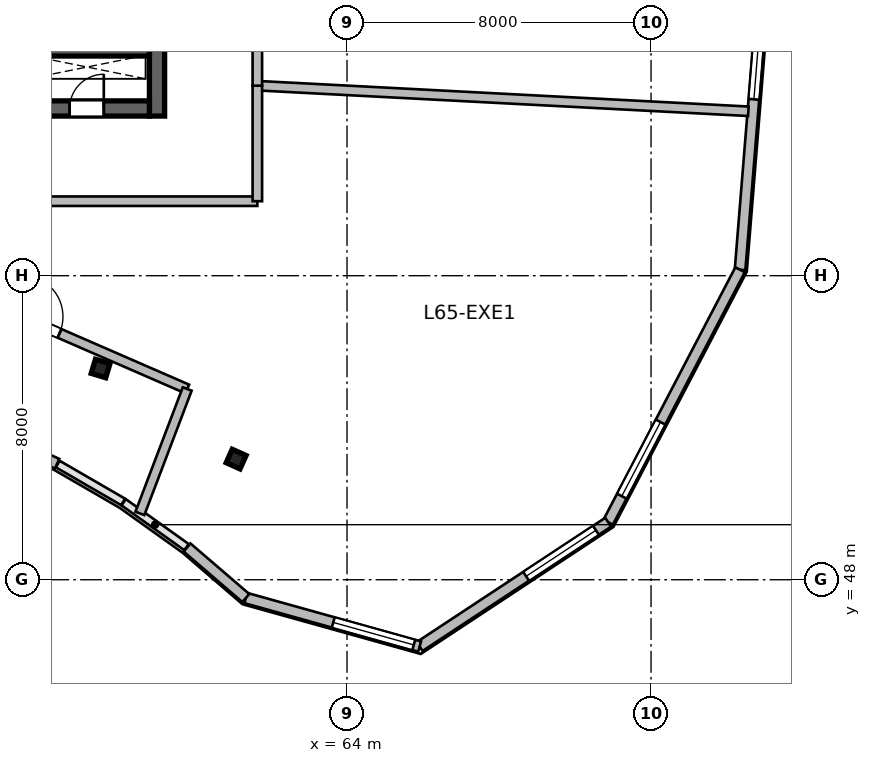
"""IFC4 building model, lengths in metres.
Left out: names, types, materials, properties, quantities, classifications, styles, units other than length and angle.
Written with IfcOpenShell. Run it as: python <this file> out.ifc"""

import sys

from ifc_helpers import new_model, si_unit, direction, frame, frame_2d, origin, origin_2d, place, context, subcontext, project, spatial, rectangle, i_section, extrude, source, transform, mapped, element, fill, save


model = new_model("IFC4")
c1 = context("Model", 3, precision=1e-05, world=origin(), true_north=direction((0.0, 1.0)))
c2 = subcontext(c1, "Body", "Model", "MODEL_VIEW")
j1 = project(units=[si_unit("LENGTHUNIT", "METRE"), si_unit("PLANEANGLEUNIT", "RADIAN")], contexts=[c1])
p1 = place(None, origin())
s1 = spatial("IfcSite", under=j1, at=p1, CompositionType="ELEMENT")
p2 = place(p1, origin())
s2 = spatial("IfcBuilding", under=s1, at=p2, CompositionType="ELEMENT")
p3 = place(p2, frame((0.0, 0.0, 267.9)))
s3 = spatial("IfcBuildingStorey", under=s2, at=p3, CompositionType="ELEMENT", Elevation=267.9)
m1 = source(origin(), c2, "Body", "SweptSolid", [
    extrude(rectangle(XDim=12.0, YDim=0.4, at=frame_2d((6.0, 0.0))), origin(), (0.0, 0.0, 1.0), 3.9),
])
p4 = place(p3, frame((59.0, 60.2, 0.0), z_axis=(0.0, 0.0, 1.0), x_axis=(0.0, 1.0, 0.0)))
e1 = element("IfcWall", 1, at=p4, inside=s3, PredefinedType="SHEAR", context=c2, shape_type="MappedRepresentation", body=[
    mapped(m1, transform((0.0, 0.0, 0.0), scale=1.0)),
])
m2 = source(origin(), c2, "Body", "SweptSolid", [
    extrude(rectangle(XDim=21.6, YDim=0.4, at=frame_2d((10.8, 0.0))), origin(), (0.0, 0.0, 1.0), 3.9),
])
p5 = place(p3, frame((37.2, 60.4, 0.0), z_axis=(0.0, 0.0, 1.0), x_axis=(1.0, 0.0, 0.0)))
e2 = element("IfcWall", 2, at=p5, inside=s3, PredefinedType="SHEAR", context=c2, shape_type="MappedRepresentation", body=[
    mapped(m2, transform((0.0, 0.0, 0.0), scale=1.0)),
])
p6 = place(p5, frame((1.1, 0.0, 0.0)))
e3 = element("IfcOpeningElement", 3, at=p6, cuts=e2, PredefinedType="OPENING", context=c2, shape_type="SweptSolid", body=[
    extrude(rectangle(XDim=1.15, YDim=2.15, at=frame_2d((0.575, 1.075))), frame((0.0, 0.21, 0.0), z_axis=(0.0, -1.0, 0.0), x_axis=(1.0, 0.0, 0.0)), (0.0, 0.0, 1.0), 0.42),
])
p7 = place(p5, frame((19.5, 0.0, 0.0)))
e4 = element("IfcOpeningElement", 4, at=p7, cuts=e2, PredefinedType="OPENING", context=c2, shape_type="SweptSolid", body=[
    extrude(rectangle(XDim=0.9, YDim=2.1, at=frame_2d((0.45, 1.05))), frame((0.0, 0.21, 0.0), z_axis=(0.0, -1.0, 0.0), x_axis=(1.0, 0.0, 0.0)), (0.0, 0.0, 1.0), 0.42),
])
p8 = place(p5, frame((12.02, 0.0, 0.0)))
e5 = element("IfcOpeningElement", 5, at=p8, cuts=e2, PredefinedType="OPENING", context=c2, shape_type="SweptSolid", body=[
    extrude(rectangle(XDim=1.6, YDim=2.15, at=frame_2d((0.8, 1.075))), frame((0.0, 0.21, 0.0), z_axis=(0.0, -1.0, 0.0), x_axis=(1.0, 0.0, 0.0)), (0.0, 0.0, 1.0), 0.42),
])
m3 = source(origin(), c2, "Body", "SweptSolid", [
    extrude(rectangle(XDim=3.27, YDim=0.22, at=frame_2d((1.635, 0.0))), origin(), (0.0, 0.0, 1.0), 3.9),
])
p9 = place(p3, frame((55.53, 61.89, 0.0), z_axis=(0.0, 0.0, 1.0), x_axis=(1.0, 0.0, 0.0)))
e6 = element("IfcWall", 6, at=p9, inside=s3, PredefinedType="SHEAR", context=c2, shape_type="MappedRepresentation", body=[
    mapped(m3, transform((0.0, 0.0, 0.0), scale=1.0)),
])
m4 = source(origin(), c2, "Body", "SweptSolid", [
    extrude(i_section(OverallWidth=0.399, OverallDepth=0.387, WebThickness=0.021, FlangeThickness=0.033, at=origin_2d()), origin(), (0.0, 0.0, 1.0), 3.9),
])
for number, where, z_axis, x_axis in (
    (7, (57.515, 53.558, 0.0), (0.0, 0.0, 1.0), (0.289, 0.957, 0.0)),
    (8, (61.082, 51.175, 0.0), (0.0, 0.0, 1.0), (0.409, 0.912, 0.0)),
):
    element("IfcColumn", number, at=place(p3, frame(where, z_axis=z_axis, x_axis=x_axis)), inside=s3, PredefinedType="COLUMN", context=c2, shape_type="MappedRepresentation", body=[
        mapped(m4, transform((0.0, 0.0, 0.0), scale=1.0)),
    ])
m5 = source(origin(), c2, "Body", "SweptSolid", [
    extrude(rectangle(XDim=7.466, YDim=0.28, at=frame_2d((3.733, 0.0))), origin(), (0.0, 0.0, 1.0), 3.65),
])
p10 = place(p3, frame((74.946, 63.597, 0.0), z_axis=(0.0, 0.0, 1.0), x_axis=(-0.080804454221, -0.996729973553, 0.0)))
e9 = element("IfcWall", 9, at=p10, inside=s3, PredefinedType="SOLIDWALL", context=c2, shape_type="MappedRepresentation", body=[
    mapped(m5, transform((0.0, 0.0, 0.0), scale=1.0)),
])
p11 = place(p10, frame((0.767, 0.0, 0.95)))
e10 = element("IfcOpeningElement", 10, at=p11, cuts=e9, PredefinedType="OPENING", context=c2, shape_type="SweptSolid", body=[
    extrude(rectangle(XDim=2.2, YDim=2.1, at=frame_2d((1.1, 1.05))), frame((0.0, 0.15, 0.0), z_axis=(0.0, -1.0, 0.0), x_axis=(1.0, 0.0, 0.0)), (0.0, 0.0, 1.0), 0.3),
])
m6 = source(origin(), c2, "Body", "SweptSolid", [
    extrude(rectangle(XDim=7.495, YDim=0.28, at=frame_2d((3.748, 0.0))), origin(), (0.0, 0.0, 1.0), 3.65),
])
p12 = place(p3, frame((74.343, 56.156, 0.0), z_axis=(0.0, 0.0, 1.0), x_axis=(-0.463116979657, -0.886297164135, 0.0)))
e11 = element("IfcWall", 11, at=p12, inside=s3, PredefinedType="SOLIDWALL", context=c2, shape_type="MappedRepresentation", body=[
    mapped(m6, transform((0.0, 0.0, 0.0), scale=1.0)),
])
p13 = place(p12, frame((4.521, 0.0, 0.95)))
e12 = element("IfcOpeningElement", 12, at=p13, cuts=e11, PredefinedType="OPENING", context=c2, shape_type="SweptSolid", body=[
    extrude(rectangle(XDim=2.2, YDim=2.1, at=frame_2d((1.1, 1.05))), frame((0.0, 0.15, 0.0), z_axis=(0.0, -1.0, 0.0), x_axis=(1.0, 0.0, 0.0)), (0.0, 0.0, 1.0), 0.3),
])
m7 = source(origin(), c2, "Body", "SweptSolid", [
    extrude(rectangle(XDim=5.942, YDim=0.28, at=frame_2d((2.971, 0.0))), origin(), (0.0, 0.0, 1.0), 3.65),
])
p14 = place(p3, frame((70.872, 49.513, 0.0), z_axis=(0.0, 0.0, 1.0), x_axis=(-0.834871099304, -0.550445499162, 0.0)))
e13 = element("IfcWall", 13, at=p14, inside=s3, PredefinedType="SOLIDWALL", context=c2, shape_type="MappedRepresentation", body=[
    mapped(m7, transform((0.0, 0.0, 0.0), scale=1.0)),
])
p15 = place(p14, frame((0.385, 0.0, 0.95)))
e14 = element("IfcOpeningElement", 14, at=p15, cuts=e13, PredefinedType="OPENING", context=c2, shape_type="SweptSolid", body=[
    extrude(rectangle(XDim=2.2, YDim=2.1, at=frame_2d((1.1, 1.05))), frame((0.0, 0.15, 0.0), z_axis=(0.0, -1.0, 0.0), x_axis=(1.0, 0.0, 0.0)), (0.0, 0.0, 1.0), 0.3),
])
m8 = source(origin(), c2, "Body", "SweptSolid", [
    extrude(rectangle(XDim=4.749, YDim=0.28, at=frame_2d((2.374, 0.0))), origin(), (0.0, 0.0, 1.0), 3.65),
])
p16 = place(p3, frame((65.91, 46.242, 0.0), z_axis=(0.0, 0.0, 1.0), x_axis=(-0.963210849911, 0.268746829961, 0.0)))
e15 = element("IfcWall", 15, at=p16, inside=s3, PredefinedType="SOLIDWALL", context=c2, shape_type="MappedRepresentation", body=[
    mapped(m8, transform((0.0, 0.0, 0.0), scale=1.0)),
])
p17 = place(p16, frame((0.16, 0.0, 0.95)))
e16 = element("IfcOpeningElement", 16, at=p17, cuts=e15, PredefinedType="OPENING", context=c2, shape_type="SweptSolid", body=[
    extrude(rectangle(XDim=2.2, YDim=2.1, at=frame_2d((1.1, 1.05))), frame((0.0, 0.15, 0.0), z_axis=(0.0, -1.0, 0.0), x_axis=(1.0, 0.0, 0.0)), (0.0, 0.0, 1.0), 0.3),
])
m9 = source(origin(), c2, "Body", "SweptSolid", [
    extrude(rectangle(XDim=2.04, YDim=0.28, at=frame_2d((1.02, 0.0))), origin(), (0.0, 0.0, 1.0), 3.65),
])
p18 = place(p3, frame((61.337, 47.519, 0.0), z_axis=(0.0, 0.0, 1.0), x_axis=(-0.758402847119, 0.651786101019, 0.0)))
e17 = element("IfcWall", 17, at=p18, inside=s3, PredefinedType="SOLIDWALL", context=c2, shape_type="MappedRepresentation", body=[
    mapped(m9, transform((0.0, 0.0, 0.0), scale=1.0)),
])
m10 = source(origin(), c2, "Body", "SweptSolid", [
    extrude(rectangle(XDim=1.95, YDim=0.28, at=frame_2d((0.975, 0.0))), origin(), (0.0, 0.0, 1.0), 3.65),
])
p19 = place(p3, frame((56.372, 51.052, 0.0), z_axis=(0.0, 0.0, 1.0), x_axis=(-0.910507945155, 0.413491574048, 0.0)))
e18 = element("IfcWall", 18, at=p19, inside=s3, PredefinedType="SOLIDWALL", context=c2, shape_type="MappedRepresentation", body=[
    mapped(m10, transform((0.0, 0.0, 0.0), scale=1.0)),
])
m11 = source(origin(), c2, "Body", "SweptSolid", [
    extrude(rectangle(XDim=8.431, YDim=0.25, at=frame_2d((4.216, 0.0))), origin(), (0.0, 0.0, 1.0), 3.65),
])
p20 = place(p3, frame((52.064, 56.385, 0.0), z_axis=(0.0, 0.0, 1.0), x_axis=(0.916868304583, -0.399189819574, 0.0)))
e19 = element("IfcWall", 19, at=p20, inside=s3, PredefinedType="PARTITIONING", context=c2, shape_type="MappedRepresentation", body=[
    mapped(m11, transform((0.0, 0.0, 0.0), scale=1.0)),
])
p21 = place(p20, frame((3.666, 0.0, 0.0)))
e20 = element("IfcOpeningElement", 20, at=p21, cuts=e19, PredefinedType="OPENING", context=c2, shape_type="SweptSolid", body=[
    extrude(rectangle(XDim=1.1, YDim=2.15, at=frame_2d((0.55, 1.075))), frame((0.0, 0.135, 0.0), z_axis=(0.0, -1.0, 0.0), x_axis=(1.0, 0.0, 0.0)), (0.0, 0.0, 1.0), 0.27),
])
m12 = source(origin(), c2, "Body", "SweptSolid", [
    extrude(rectangle(XDim=3.502, YDim=0.25, at=frame_2d((1.751, 0.0))), origin(), (0.0, 0.0, 1.0), 3.65),
])
p22 = place(p3, frame((58.55, 49.746, 0.0), z_axis=(0.0, 0.0, 1.0), x_axis=(0.35542122772, 0.934706237749, 0.0)))
e21 = element("IfcWall", 21, at=p22, inside=s3, PredefinedType="PARTITIONING", context=c2, shape_type="MappedRepresentation", body=[
    mapped(m12, transform((0.0, 0.0, 0.0), scale=1.0)),
])
m13 = source(origin(), c2, "Body", "SweptSolid", [
    extrude(rectangle(XDim=12.39, YDim=0.25, at=frame_2d((6.195, 0.0))), origin(), (0.0, 0.0, 1.0), 3.65),
])
p23 = place(p3, frame((49.25, 57.96, 0.0), z_axis=(0.0, 0.0, 1.0), x_axis=(1.0, 0.0, 0.0)))
e22 = element("IfcWall", 22, at=p23, inside=s3, PredefinedType="PARTITIONING", context=c2, shape_type="MappedRepresentation", body=[
    mapped(m13, transform((0.0, 0.0, 0.0), scale=1.0)),
])
m14 = source(origin(), c2, "Body", "SweptSolid", [
    extrude(rectangle(XDim=12.938, YDim=0.25, at=frame_2d((6.469, 0.0))), origin(), (0.0, 0.0, 1.0), 3.65),
])
p24 = place(p3, frame((61.64, 61.0, 0.0), z_axis=(0.0, 0.0, 1.0), x_axis=(0.998643821866, -0.052062626215, 0.0)))
e23 = element("IfcWall", 23, at=p24, inside=s3, PredefinedType="PARTITIONING", context=c2, shape_type="MappedRepresentation", body=[
    mapped(m14, transform((0.0, 0.0, 0.0), scale=1.0)),
])
m15 = source(origin(), c2, "Body", "SweptSolid", [
    extrude(rectangle(XDim=3.04, YDim=0.25, at=frame_2d((1.52, 0.0))), origin(), (0.0, 0.0, 1.0), 3.65),
])
p25 = place(p3, frame((61.64, 57.96, 0.0), z_axis=(0.0, 0.0, 1.0), x_axis=(0.0, 1.0, 0.0)))
e24 = element("IfcWall", 24, at=p25, inside=s3, PredefinedType="PARTITIONING", context=c2, shape_type="MappedRepresentation", body=[
    mapped(m15, transform((0.0, 0.0, 0.0), scale=1.0)),
])
m16 = source(origin(), c2, "Body", "SweptSolid", [
    extrude(rectangle(XDim=3.8, YDim=0.25, at=frame_2d((1.9, 0.0))), origin(), (0.0, 0.0, 1.0), 3.65),
])
p26 = place(p3, frame((61.64, 61.0, 0.0), z_axis=(0.0, 0.0, 1.0), x_axis=(0.0, 1.0, 0.0)))
e25 = element("IfcWall", 25, at=p26, inside=s3, PredefinedType="PARTITIONING", context=c2, shape_type="MappedRepresentation", body=[
    mapped(m16, transform((0.0, 0.0, 0.0), scale=1.0)),
])
p27 = place(p26, frame((0.969, 0.0, 0.0)))
e26 = element("IfcOpeningElement", 26, at=p27, cuts=e25, PredefinedType="OPENING", context=c2, shape_type="SweptSolid", body=[
    extrude(rectangle(XDim=0.95, YDim=2.1, at=frame_2d((0.475, 1.05))), frame((0.0, 0.135, 0.0), z_axis=(0.0, -1.0, 0.0), x_axis=(1.0, 0.0, 0.0)), (0.0, 0.0, 1.0), 0.27),
])
m17 = source(origin(), c2, "Body", "SweptSolid", [
    extrude(rectangle(XDim=2.2, YDim=2.1, at=frame_2d((1.1, 1.05))), frame((0.0, 0.03, 0.0), z_axis=(0.0, -1.0, 0.0), x_axis=(1.0, 0.0, 0.0)), (0.0, 0.0, 1.0), 0.06),
])
p28 = place(p11, origin())
e27 = element("IfcWindow", 27, at=p28, inside=s3, PartitioningType="TRIPLE_PANEL_VERTICAL", PredefinedType="WINDOW", context=c2, shape_type="MappedRepresentation", body=[
    mapped(m17, transform((0.0, 0.0, 0.0), scale=1.0)),
])
fill(e10, e27)
p29 = place(p13, origin())
e28 = element("IfcWindow", 28, at=p29, inside=s3, PartitioningType="TRIPLE_PANEL_VERTICAL", PredefinedType="WINDOW", context=c2, shape_type="MappedRepresentation", body=[
    mapped(m17, transform((0.0, 0.0, 0.0), scale=1.0)),
])
fill(e12, e28)
p30 = place(p15, origin())
e29 = element("IfcWindow", 29, at=p30, inside=s3, PartitioningType="TRIPLE_PANEL_VERTICAL", PredefinedType="WINDOW", context=c2, shape_type="MappedRepresentation", body=[
    mapped(m17, transform((0.0, 0.0, 0.0), scale=1.0)),
])
fill(e14, e29)
p31 = place(p17, origin())
e30 = element("IfcWindow", 30, at=p31, inside=s3, PartitioningType="TRIPLE_PANEL_VERTICAL", PredefinedType="WINDOW", context=c2, shape_type="MappedRepresentation", body=[
    mapped(m17, transform((0.0, 0.0, 0.0), scale=1.0)),
])
fill(e16, e30)
m18 = source(origin(), c2, "Body", "SweptSolid", [
    extrude(rectangle(XDim=0.9, YDim=2.1, at=frame_2d((0.45, 1.05))), frame((0.0, 0.025, 0.0), z_axis=(0.0, -1.0, 0.0), x_axis=(1.0, 0.0, 0.0)), (0.0, 0.0, 1.0), 0.05),
])
p32 = place(p7, origin())
e31 = element("IfcDoor", 31, at=p32, inside=s3, OperationType="SINGLE_SWING_RIGHT", PredefinedType="DOOR", context=c2, shape_type="MappedRepresentation", body=[
    mapped(m18, transform((0.0, 0.0, 0.0), scale=1.0)),
])
fill(e4, e31)
m19 = source(origin(), c2, "Body", "SweptSolid", [
    extrude(rectangle(XDim=1.1, YDim=2.15, at=frame_2d((0.55, 1.075))), frame((0.0, 0.025, 0.0), z_axis=(0.0, -1.0, 0.0), x_axis=(1.0, 0.0, 0.0)), (0.0, 0.0, 1.0), 0.05),
])
p33 = place(p21, origin())
e32 = element("IfcDoor", 32, at=p33, inside=s3, OperationType="SINGLE_SWING_LEFT", PredefinedType="DOOR", context=c2, shape_type="MappedRepresentation", body=[
    mapped(m19, transform((0.0, 0.0, 0.0), scale=1.0)),
])
fill(e20, e32)
save(model, sys.argv[1])
